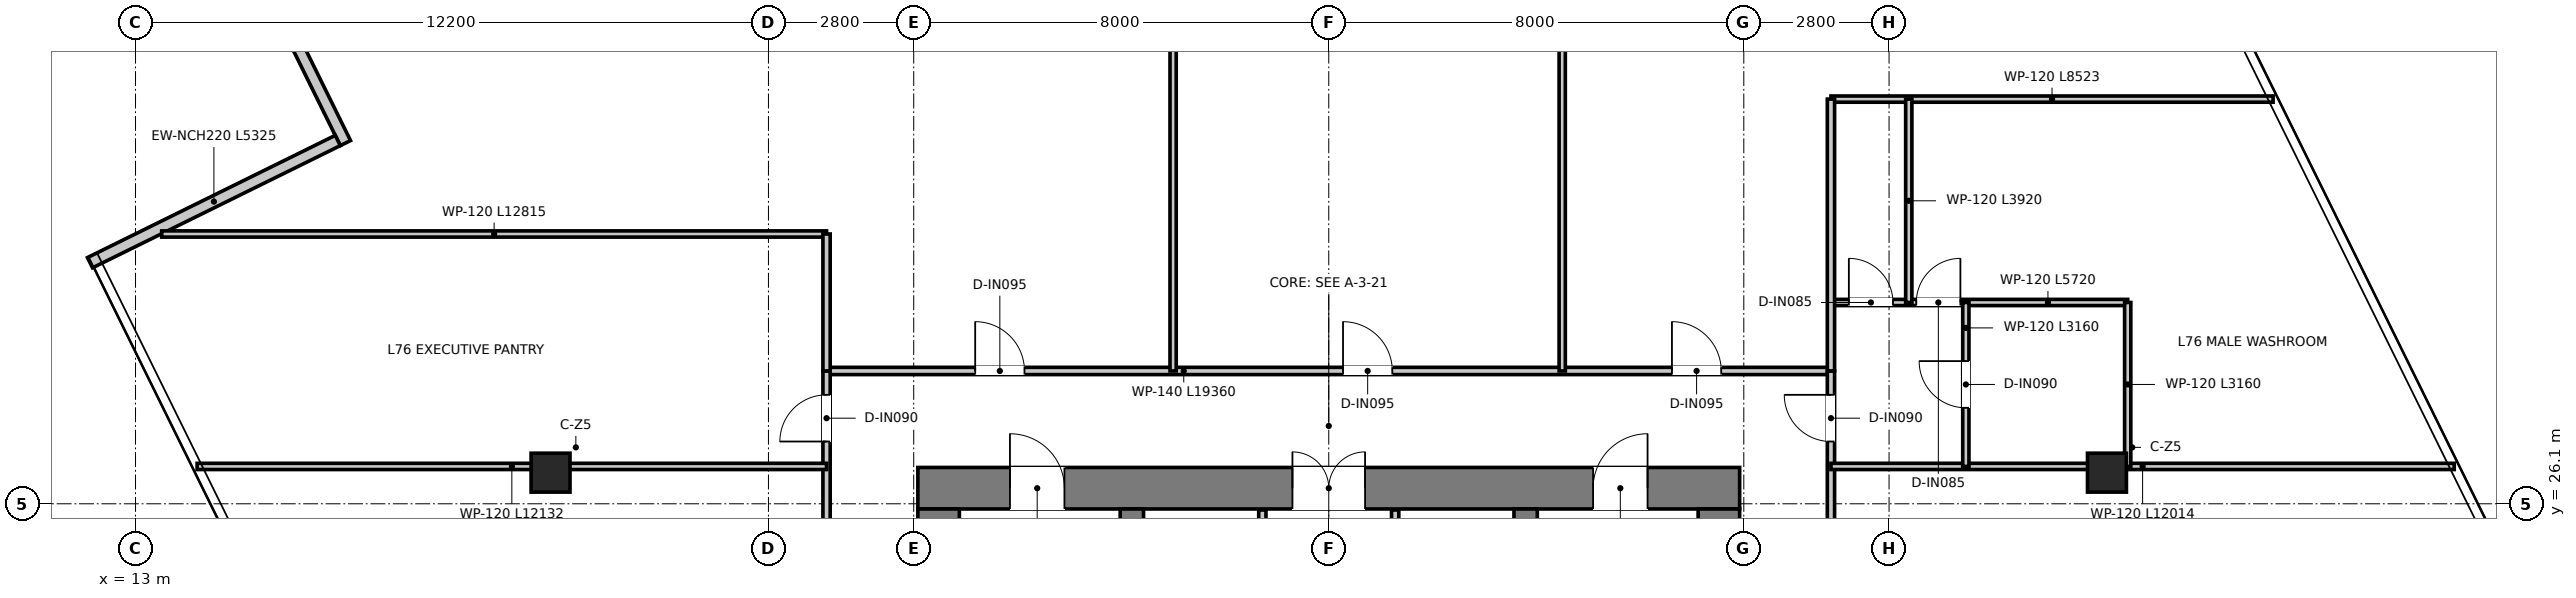
"""IFC4 building model, lengths in metres.
Left out: names, types, materials, properties, quantities, classifications, styles, units other than length and angle.
Written with IfcOpenShell. Run it as: python <this file> out.ifc"""

import sys

from ifc_helpers import new_model, si_unit, direction, frame, frame_2d, origin, origin_2d, place, context, subcontext, project, spatial, rectangle, extrude, source, transform, mapped, element, fill, save


model = new_model("IFC4")
c1 = context("Model", 3, precision=1e-05, world=origin(), true_north=direction((0.0, 1.0)))
c2 = subcontext(c1, "Body", "Model", "MODEL_VIEW")
j1 = project(units=[si_unit("LENGTHUNIT", "METRE"), si_unit("PLANEANGLEUNIT", "RADIAN")], contexts=[c1])
p1 = place(None, origin())
s1 = spatial("IfcSite", under=j1, at=p1, CompositionType="ELEMENT")
p2 = place(p1, origin())
s2 = spatial("IfcBuilding", under=s1, at=p2, CompositionType="ELEMENT")
p3 = place(p2, frame((0.0, 0.0, 310.85)))
s3 = spatial("IfcBuildingStorey", under=s2, at=p3, CompositionType="ELEMENT", Elevation=310.85)
p4 = place(p3, frame((28.08, 26.4, 0.0), z_axis=(0.0, 0.0, 1.0), x_axis=(1.0, 0.0, 0.0)))
e1 = element("IfcWall", 1, at=p4, inside=s3, PredefinedType="SHEAR", context=c2, shape_type="SweptSolid", body=[
    extrude(rectangle(XDim=15.84, YDim=0.8, at=frame_2d((7.92, 0.0))), origin(), (0.0, 0.0, 1.0), 3.95),
])
p5 = place(p4, frame((7.22, 0.0, 0.0)))
e2 = element("IfcOpeningElement", 2, at=p5, cuts=e1, PredefinedType="OPENING", context=c2, shape_type="SweptSolid", body=[
    extrude(rectangle(XDim=1.4, YDim=2.2, at=frame_2d((0.7, 1.1))), frame((0.0, 0.41, 0.0), z_axis=(0.0, -1.0, 0.0), x_axis=(1.0, 0.0, 0.0)), (0.0, 0.0, 1.0), 0.82),
])
p6 = place(p4, frame((1.775, 0.0, 0.0)))
e3 = element("IfcOpeningElement", 3, at=p6, cuts=e1, PredefinedType="OPENING", context=c2, shape_type="SweptSolid", body=[
    extrude(rectangle(XDim=1.05, YDim=2.1, at=frame_2d((0.525, 1.05))), frame((0.0, 0.41, 0.0), z_axis=(0.0, -1.0, 0.0), x_axis=(1.0, 0.0, 0.0)), (0.0, 0.0, 1.0), 0.82),
])
p7 = place(p4, frame((13.015, 0.0, 0.0)))
e4 = element("IfcOpeningElement", 4, at=p7, cuts=e1, PredefinedType="OPENING", context=c2, shape_type="SweptSolid", body=[
    extrude(rectangle(XDim=1.05, YDim=2.1, at=frame_2d((0.525, 1.05))), frame((0.0, 0.41, 0.0), z_axis=(0.0, -1.0, 0.0), x_axis=(1.0, 0.0, 0.0)), (0.0, 0.0, 1.0), 0.82),
])
for number, where, z_axis, x_axis in (
    (5, (28.48, 11.3, 0.0), (0.0, 0.0, 1.0), (0.0, 1.0, 0.0)),
    (6, (43.52, 11.3, 0.0), (0.0, 0.0, 1.0), (0.0, 1.0, 0.0)),
):
    element("IfcWall", number, at=place(p3, frame(where, z_axis=z_axis, x_axis=x_axis)), inside=s3, PredefinedType="SHEAR", context=c2, shape_type="SweptSolid", body=[
        extrude(rectangle(XDim=14.7, YDim=0.8, at=frame_2d((7.35, 0.0))), origin(), (0.0, 0.0, 1.0), 3.95),
    ])
p8 = place(p3, frame((32.205, 13.22, 0.0), z_axis=(0.0, 0.0, 1.0), x_axis=(0.0, 1.0, 0.0)))
e7 = element("IfcWall", 7, at=p8, inside=s3, PredefinedType="SHEAR", context=c2, shape_type="SweptSolid", body=[
    extrude(rectangle(XDim=12.78, YDim=0.45, at=frame_2d((6.39, 0.0))), origin(), (0.0, 0.0, 1.0), 3.95),
])
p9 = place(p8, frame((10.58, 0.0, 0.0)))
e8 = element("IfcOpeningElement", 8, at=p9, cuts=e7, PredefinedType="OPENING", context=c2, shape_type="SweptSolid", body=[
    extrude(rectangle(XDim=1.1, YDim=2.15, at=frame_2d((0.55, 1.075))), frame((0.0, 0.235, 0.0), z_axis=(0.0, -1.0, 0.0), x_axis=(1.0, 0.0, 0.0)), (0.0, 0.0, 1.0), 0.47),
])
p10 = place(p3, frame((39.795, 13.22, 0.0), z_axis=(0.0, 0.0, 1.0), x_axis=(0.0, 1.0, 0.0)))
e9 = element("IfcWall", 9, at=p10, inside=s3, PredefinedType="SHEAR", context=c2, shape_type="SweptSolid", body=[
    extrude(rectangle(XDim=12.78, YDim=0.45, at=frame_2d((6.39, 0.0))), origin(), (0.0, 0.0, 1.0), 3.95),
])
p11 = place(p10, frame((10.58, 0.0, 0.0)))
e10 = element("IfcOpeningElement", 10, at=p11, cuts=e9, PredefinedType="OPENING", context=c2, shape_type="SweptSolid", body=[
    extrude(rectangle(XDim=1.1, YDim=2.15, at=frame_2d((0.55, 1.075))), frame((0.0, 0.235, 0.0), z_axis=(0.0, -1.0, 0.0), x_axis=(1.0, 0.0, 0.0)), (0.0, 0.0, 1.0), 0.47),
])
m1 = source(origin(), c2, "Body", "SweptSolid", [
    extrude(rectangle(XDim=0.75, YDim=0.75, at=origin_2d()), origin(), (0.0, 0.0, 1.0), 3.95),
])
for number, where, z_axis, x_axis in (
    (11, (21.0, 26.7, 0.0), (0.0, 0.0, 1.0), (1.0, 0.0, 0.0)),
    (12, (51.0, 26.7, 0.0), (0.0, 0.0, 1.0), (1.0, 0.0, 0.0)),
):
    element("IfcColumn", number, at=place(p3, frame(where, z_axis=z_axis, x_axis=x_axis)), inside=s3, PredefinedType="COLUMN", context=c2, shape_type="MappedRepresentation", body=[
        mapped(m1, transform((0.0, 0.0, 0.0), x_axis=(1.0, 0.0, 0.0), y_axis=(0.0, 1.0, 0.0), z_axis=(0.0, 0.0, 1.0), scale=1.0)),
    ])
p12 = place(p3, frame((14.594, 38.025, 0.0), z_axis=(0.0, 0.0, 1.0), x_axis=(0.442275503639, -0.896879244314, 0.0)))
e13 = element("IfcWall", 13, at=p12, inside=s3, PredefinedType="ELEMENTEDWALL", context=c2, shape_type="SweptSolid", body=[
    extrude(rectangle(XDim=5.545, YDim=0.22, at=frame_2d((2.772, 0.0))), origin(), (0.0, 0.0, 1.0), 3.67),
])
p13 = place(p3, frame((16.899, 33.102, 0.0), z_axis=(0.0, 0.0, 1.0), x_axis=(-0.896889306105, -0.442255099003, 0.0)))
e14 = element("IfcWall", 14, at=p13, inside=s3, PredefinedType="ELEMENTEDWALL", context=c2, shape_type="SweptSolid", body=[
    extrude(rectangle(XDim=5.325, YDim=0.22, at=frame_2d((2.663, 0.0))), origin(), (0.0, 0.0, 1.0), 3.67),
])
p14 = place(p3, frame((34.72, 20.2, 0.0), z_axis=(0.0, 0.0, 1.0), x_axis=(0.0, 1.0, 0.0)))
e15 = element("IfcWall", 15, at=p14, inside=s3, PredefinedType="PARTITIONING", context=c2, shape_type="SweptSolid", body=[
    extrude(rectangle(XDim=5.78, YDim=0.14, at=frame_2d((2.89, 0.0))), origin(), (0.0, 0.0, 1.0), 2.82),
])
p15 = place(p14, frame((1.05, 0.0, 0.0)))
e16 = element("IfcOpeningElement", 16, at=p15, cuts=e15, PredefinedType="OPENING", context=c2, shape_type="SweptSolid", body=[
    extrude(rectangle(XDim=0.9, YDim=2.1, at=frame_2d((0.45, 1.05))), frame((0.0, 0.08, 0.0), z_axis=(0.0, -1.0, 0.0), x_axis=(1.0, 0.0, 0.0)), (0.0, 0.0, 1.0), 0.16),
])
p16 = place(p3, frame((37.28, 20.2, 0.0), z_axis=(0.0, 0.0, 1.0), x_axis=(0.0, 1.0, 0.0)))
e17 = element("IfcWall", 17, at=p16, inside=s3, PredefinedType="PARTITIONING", context=c2, shape_type="SweptSolid", body=[
    extrude(rectangle(XDim=5.78, YDim=0.14, at=frame_2d((2.89, 0.0))), origin(), (0.0, 0.0, 1.0), 2.82),
])
p17 = place(p16, frame((0.95, 0.0, 0.0)))
e18 = element("IfcOpeningElement", 18, at=p17, cuts=e17, PredefinedType="OPENING", context=c2, shape_type="SweptSolid", body=[
    extrude(rectangle(XDim=1.1, YDim=2.15, at=frame_2d((0.55, 1.075))), frame((0.0, 0.08, 0.0), z_axis=(0.0, -1.0, 0.0), x_axis=(1.0, 0.0, 0.0)), (0.0, 0.0, 1.0), 0.16),
])
p18 = place(p3, frame((26.32, 28.66, 0.0), z_axis=(0.0, 0.0, 1.0), x_axis=(1.0, 0.0, 0.0)))
e19 = element("IfcWall", 19, at=p18, inside=s3, PredefinedType="PARTITIONING", context=c2, shape_type="SweptSolid", body=[
    extrude(rectangle(XDim=19.36, YDim=0.14, at=frame_2d((9.68, 0.0))), origin(), (0.0, 0.0, 1.0), 3.18),
])
p19 = place(p18, frame((2.865, 0.0, 0.0)))
e20 = element("IfcOpeningElement", 20, at=p19, cuts=e19, PredefinedType="OPENING", context=c2, shape_type="SweptSolid", body=[
    extrude(rectangle(XDim=0.95, YDim=2.1, at=frame_2d((0.475, 1.05))), frame((0.0, 0.08, 0.0), z_axis=(0.0, -1.0, 0.0), x_axis=(1.0, 0.0, 0.0)), (0.0, 0.0, 1.0), 0.16),
])
p20 = place(p18, frame((9.955, 0.0, 0.0)))
e21 = element("IfcOpeningElement", 21, at=p20, cuts=e19, PredefinedType="OPENING", context=c2, shape_type="SweptSolid", body=[
    extrude(rectangle(XDim=0.95, YDim=2.1, at=frame_2d((0.475, 1.05))), frame((0.0, 0.08, 0.0), z_axis=(0.0, -1.0, 0.0), x_axis=(1.0, 0.0, 0.0)), (0.0, 0.0, 1.0), 0.16),
])
p21 = place(p18, frame((16.295, 0.0, 0.0)))
e22 = element("IfcOpeningElement", 22, at=p21, cuts=e19, PredefinedType="OPENING", context=c2, shape_type="SweptSolid", body=[
    extrude(rectangle(XDim=0.95, YDim=2.1, at=frame_2d((0.475, 1.05))), frame((0.0, 0.08, 0.0), z_axis=(0.0, -1.0, 0.0), x_axis=(1.0, 0.0, 0.0)), (0.0, 0.0, 1.0), 0.16),
])
p22 = place(p3, frame((26.32, 9.0, 0.0), z_axis=(0.0, 0.0, 1.0), x_axis=(0.0, 1.0, 0.0)))
e23 = element("IfcWall", 23, at=p22, inside=s3, PredefinedType="PARTITIONING", context=c2, shape_type="SweptSolid", body=[
    extrude(rectangle(XDim=19.66, YDim=0.14, at=frame_2d((9.83, 0.0))), origin(), (0.0, 0.0, 1.0), 3.13),
])
p23 = place(p22, frame((18.3, 0.0, 0.0)))
e24 = element("IfcOpeningElement", 24, at=p23, cuts=e23, PredefinedType="OPENING", context=c2, shape_type="SweptSolid", body=[
    extrude(rectangle(XDim=0.9, YDim=2.1, at=frame_2d((0.45, 1.05))), frame((0.0, 0.08, 0.0), z_axis=(0.0, -1.0, 0.0), x_axis=(1.0, 0.0, 0.0)), (0.0, 0.0, 1.0), 0.16),
])
p24 = place(p22, frame((1.95, 0.0, 0.0)))
e25 = element("IfcOpeningElement", 25, at=p24, cuts=e23, PredefinedType="OPENING", context=c2, shape_type="SweptSolid", body=[
    extrude(rectangle(XDim=0.9, YDim=2.1, at=frame_2d((0.45, 1.05))), frame((0.0, 0.08, 0.0), z_axis=(0.0, -1.0, 0.0), x_axis=(1.0, 0.0, 0.0)), (0.0, 0.0, 1.0), 0.16),
])
p25 = place(p22, frame((10.2, 0.0, 0.0)))
e26 = element("IfcOpeningElement", 26, at=p25, cuts=e23, PredefinedType="OPENING", context=c2, shape_type="SweptSolid", body=[
    extrude(rectangle(XDim=0.9, YDim=2.1, at=frame_2d((0.45, 1.05))), frame((0.0, 0.08, 0.0), z_axis=(0.0, -1.0, 0.0), x_axis=(1.0, 0.0, 0.0)), (0.0, 0.0, 1.0), 0.16),
])
p26 = place(p22, frame((14.86, 0.0, 0.0)))
e27 = element("IfcOpeningElement", 27, at=p26, cuts=e23, PredefinedType="OPENING", context=c2, shape_type="SweptSolid", body=[
    extrude(rectangle(XDim=0.9, YDim=2.1, at=frame_2d((0.45, 1.05))), frame((0.0, 0.08, 0.0), z_axis=(0.0, -1.0, 0.0), x_axis=(1.0, 0.0, 0.0)), (0.0, 0.0, 1.0), 0.16),
])
p27 = place(p3, frame((45.68, 9.72, 0.0), z_axis=(0.0, 0.0, 1.0), x_axis=(0.0, 1.0, 0.0)))
e28 = element("IfcWall", 28, at=p27, inside=s3, PredefinedType="PARTITIONING", context=c2, shape_type="SweptSolid", body=[
    extrude(rectangle(XDim=18.94, YDim=0.14, at=frame_2d((9.47, 0.0))), origin(), (0.0, 0.0, 1.0), 3.13),
])
p28 = place(p27, frame((17.58, 0.0, 0.0)))
e29 = element("IfcOpeningElement", 29, at=p28, cuts=e28, PredefinedType="OPENING", context=c2, shape_type="SweptSolid", body=[
    extrude(rectangle(XDim=0.9, YDim=2.1, at=frame_2d((0.45, 1.05))), frame((0.0, 0.08, 0.0), z_axis=(0.0, -1.0, 0.0), x_axis=(1.0, 0.0, 0.0)), (0.0, 0.0, 1.0), 0.16),
])
p29 = place(p27, frame((11.99, 0.0, 0.0)))
e30 = element("IfcOpeningElement", 30, at=p29, cuts=e28, PredefinedType="OPENING", context=c2, shape_type="SweptSolid", body=[
    extrude(rectangle(XDim=0.9, YDim=2.1, at=frame_2d((0.45, 1.05))), frame((0.0, 0.08, 0.0), z_axis=(0.0, -1.0, 0.0), x_axis=(1.0, 0.0, 0.0)), (0.0, 0.0, 1.0), 0.16),
])
p30 = place(p3, frame((45.68, 26.82, 0.0), z_axis=(0.0, 0.0, 1.0), x_axis=(1.0, 0.0, 0.0)))
e31 = element("IfcWall", 31, at=p30, inside=s3, PredefinedType="PARTITIONING", context=c2, shape_type="SweptSolid", body=[
    extrude(rectangle(XDim=12.014, YDim=0.12, at=frame_2d((6.007, 0.0))), origin(), (0.0, 0.0, 1.0), 3.13),
])
p31 = place(p3, frame((45.68, 33.9, 0.0), z_axis=(0.0, 0.0, 1.0), x_axis=(1.0, 0.0, 0.0)))
e32 = element("IfcWall", 32, at=p31, inside=s3, PredefinedType="PARTITIONING", context=c2, shape_type="SweptSolid", body=[
    extrude(rectangle(XDim=8.523, YDim=0.12, at=frame_2d((4.261, 0.0))), origin(), (0.0, 0.0, 1.0), 3.13),
])
p32 = place(p3, frame((45.68, 29.98, 0.0), z_axis=(0.0, 0.0, 1.0), x_axis=(1.0, 0.0, 0.0)))
e33 = element("IfcWall", 33, at=p32, inside=s3, PredefinedType="PARTITIONING", context=c2, shape_type="SweptSolid", body=[
    extrude(rectangle(XDim=5.72, YDim=0.12, at=frame_2d((2.86, 0.0))), origin(), (0.0, 0.0, 1.0), 3.13),
])
p33 = place(p32, frame((1.645, 0.0, 0.0)))
e34 = element("IfcOpeningElement", 34, at=p33, cuts=e33, PredefinedType="OPENING", context=c2, shape_type="SweptSolid", body=[
    extrude(rectangle(XDim=0.85, YDim=2.1, at=frame_2d((0.425, 1.05))), frame((0.0, 0.07, 0.0), z_axis=(0.0, -1.0, 0.0), x_axis=(1.0, 0.0, 0.0)), (0.0, 0.0, 1.0), 0.14),
])
p34 = place(p32, frame((0.345, 0.0, 0.0)))
e35 = element("IfcOpeningElement", 35, at=p34, cuts=e33, PredefinedType="OPENING", context=c2, shape_type="SweptSolid", body=[
    extrude(rectangle(XDim=0.85, YDim=2.1, at=frame_2d((0.425, 1.05))), frame((0.0, 0.07, 0.0), z_axis=(0.0, -1.0, 0.0), x_axis=(1.0, 0.0, 0.0)), (0.0, 0.0, 1.0), 0.14),
])
p35 = place(p3, frame((51.4, 26.82, 0.0), z_axis=(0.0, 0.0, 1.0), x_axis=(0.0, 1.0, 0.0)))
e36 = element("IfcWall", 36, at=p35, inside=s3, PredefinedType="PARTITIONING", context=c2, shape_type="SweptSolid", body=[
    extrude(rectangle(XDim=3.16, YDim=0.12, at=frame_2d((1.58, 0.0))), origin(), (0.0, 0.0, 1.0), 3.67),
])
p36 = place(p3, frame((48.28, 26.82, 0.0), z_axis=(0.0, 0.0, 1.0), x_axis=(0.0, 1.0, 0.0)))
e37 = element("IfcWall", 37, at=p36, inside=s3, PredefinedType="PARTITIONING", context=c2, shape_type="SweptSolid", body=[
    extrude(rectangle(XDim=3.16, YDim=0.12, at=frame_2d((1.58, 0.0))), origin(), (0.0, 0.0, 1.0), 3.18),
])
p37 = place(p36, frame((1.13, 0.0, 0.0)))
e38 = element("IfcOpeningElement", 38, at=p37, cuts=e37, PredefinedType="OPENING", context=c2, shape_type="SweptSolid", body=[
    extrude(rectangle(XDim=0.9, YDim=2.1, at=frame_2d((0.45, 1.05))), frame((0.0, 0.07, 0.0), z_axis=(0.0, -1.0, 0.0), x_axis=(1.0, 0.0, 0.0)), (0.0, 0.0, 1.0), 0.14),
])
p38 = place(p3, frame((47.18, 29.98, 0.0), z_axis=(0.0, 0.0, 1.0), x_axis=(0.0, 1.0, 0.0)))
e39 = element("IfcWall", 39, at=p38, inside=s3, PredefinedType="PARTITIONING", context=c2, shape_type="SweptSolid", body=[
    extrude(rectangle(XDim=3.92, YDim=0.12, at=frame_2d((1.96, 0.0))), origin(), (0.0, 0.0, 1.0), 3.31),
])
p39 = place(p3, frame((14.188, 26.82, 0.0), z_axis=(0.0, 0.0, 1.0), x_axis=(1.0, 0.0, 0.0)))
e40 = element("IfcWall", 40, at=p39, inside=s3, PredefinedType="PARTITIONING", context=c2, shape_type="SweptSolid", body=[
    extrude(rectangle(XDim=12.133, YDim=0.12, at=frame_2d((6.066, 0.0))), origin(), (0.0, 0.0, 1.0), 3.13),
])
p40 = place(p3, frame((13.505, 31.3, 0.0), z_axis=(0.0, 0.0, 1.0), x_axis=(1.0, 0.0, 0.0)))
e41 = element("IfcWall", 41, at=p40, inside=s3, PredefinedType="PARTITIONING", context=c2, shape_type="SweptSolid", body=[
    extrude(rectangle(XDim=12.815, YDim=0.12, at=frame_2d((6.408, 0.0))), origin(), (0.0, 0.0, 1.0), 3.13),
])
p41 = place(p3, frame((26.32, 28.66, 0.0), z_axis=(0.0, 0.0, 1.0), x_axis=(0.0, 1.0, 0.0)))
e42 = element("IfcWall", 42, at=p41, inside=s3, PredefinedType="PARTITIONING", context=c2, shape_type="SweptSolid", body=[
    extrude(rectangle(XDim=2.64, YDim=0.14, at=frame_2d((1.32, 0.0))), origin(), (0.0, 0.0, 1.0), 3.43),
])
p42 = place(p3, frame((45.68, 28.66, 0.0), z_axis=(0.0, 0.0, 1.0), x_axis=(0.0, 1.0, 0.0)))
e43 = element("IfcWall", 43, at=p42, inside=s3, PredefinedType="PARTITIONING", context=c2, shape_type="SweptSolid", body=[
    extrude(rectangle(XDim=5.24, YDim=0.14, at=frame_2d((2.62, 0.0))), origin(), (0.0, 0.0, 1.0), 3.43),
])
p43 = place(p3, frame((33.0, 28.66, 0.0), z_axis=(0.0, 0.0, 1.0), x_axis=(0.0, 1.0, 0.0)))
e44 = element("IfcWall", 44, at=p43, inside=s3, PredefinedType="PARTITIONING", context=c2, shape_type="SweptSolid", body=[
    extrude(rectangle(XDim=18.314, YDim=0.12, at=frame_2d((9.157, 0.0))), origin(), (0.0, 0.0, 1.0), 3.13),
])
p44 = place(p3, frame((40.5, 28.66, 0.0), z_axis=(0.0, 0.0, 1.0), x_axis=(0.0, 1.0, 0.0)))
e45 = element("IfcWall", 45, at=p44, inside=s3, PredefinedType="PARTITIONING", context=c2, shape_type="SweptSolid", body=[
    extrude(rectangle(XDim=20.738, YDim=0.12, at=frame_2d((10.369, 0.0))), origin(), (0.0, 0.0, 1.0), 3.13),
])
p45 = place(p5, origin())
e46 = element("IfcDoor", 46, at=p45, inside=s3, OperationType="DOUBLE_DOOR_SINGLE_SWING", PredefinedType="DOOR", context=c2, shape_type="SweptSolid", body=[
    extrude(rectangle(XDim=1.4, YDim=2.2, at=frame_2d((0.7, 1.1))), frame((0.0, 0.025, 0.0), z_axis=(0.0, -1.0, 0.0), x_axis=(1.0, 0.0, 0.0)), (0.0, 0.0, 1.0), 0.05),
])
fill(e2, e46)
p46 = place(p6, origin())
e47 = element("IfcDoor", 47, at=p46, inside=s3, OperationType="SINGLE_SWING_LEFT", PredefinedType="DOOR", context=c2, shape_type="SweptSolid", body=[
    extrude(rectangle(XDim=1.05, YDim=2.1, at=frame_2d((0.525, 1.05))), frame((0.0, 0.025, 0.0), z_axis=(0.0, -1.0, 0.0), x_axis=(1.0, 0.0, 0.0)), (0.0, 0.0, 1.0), 0.05),
])
fill(e3, e47)
p47 = place(p7, origin())
e48 = element("IfcDoor", 48, at=p47, inside=s3, OperationType="SINGLE_SWING_RIGHT", PredefinedType="DOOR", context=c2, shape_type="SweptSolid", body=[
    extrude(rectangle(XDim=1.05, YDim=2.1, at=frame_2d((0.525, 1.05))), frame((0.0, 0.025, 0.0), z_axis=(0.0, -1.0, 0.0), x_axis=(1.0, 0.0, 0.0)), (0.0, 0.0, 1.0), 0.05),
])
fill(e4, e48)
p48 = place(p28, origin())
e49 = element("IfcDoor", 49, at=p48, inside=s3, OperationType="SINGLE_SWING_RIGHT", PredefinedType="DOOR", context=c2, shape_type="SweptSolid", body=[
    extrude(rectangle(XDim=0.9, YDim=2.1, at=frame_2d((0.45, 1.05))), frame((0.0, 0.025, 0.0), z_axis=(0.0, -1.0, 0.0), x_axis=(1.0, 0.0, 0.0)), (0.0, 0.0, 1.0), 0.05),
])
fill(e29, e49)
p49 = place(p23, origin())
e50 = element("IfcDoor", 50, at=p49, inside=s3, OperationType="SINGLE_SWING_LEFT", PredefinedType="DOOR", context=c2, shape_type="SweptSolid", body=[
    extrude(rectangle(XDim=0.9, YDim=2.1, at=frame_2d((0.45, 1.05))), frame((0.0, 0.025, 0.0), z_axis=(0.0, -1.0, 0.0), x_axis=(1.0, 0.0, 0.0)), (0.0, 0.0, 1.0), 0.05),
])
fill(e24, e50)
p50 = place(p33, origin())
e51 = element("IfcDoor", 51, at=p50, inside=s3, OperationType="SINGLE_SWING_RIGHT", PredefinedType="DOOR", context=c2, shape_type="SweptSolid", body=[
    extrude(rectangle(XDim=0.85, YDim=2.1, at=frame_2d((0.425, 1.05))), frame((0.0, 0.025, 0.0), z_axis=(0.0, -1.0, 0.0), x_axis=(1.0, 0.0, 0.0)), (0.0, 0.0, 1.0), 0.05),
])
fill(e34, e51)
p51 = place(p34, origin())
e52 = element("IfcDoor", 52, at=p51, inside=s3, OperationType="SINGLE_SWING_LEFT", PredefinedType="DOOR", context=c2, shape_type="SweptSolid", body=[
    extrude(rectangle(XDim=0.85, YDim=2.1, at=frame_2d((0.425, 1.05))), frame((0.0, 0.025, 0.0), z_axis=(0.0, -1.0, 0.0), x_axis=(1.0, 0.0, 0.0)), (0.0, 0.0, 1.0), 0.05),
])
fill(e35, e52)
p52 = place(p37, origin())
e53 = element("IfcDoor", 53, at=p52, inside=s3, OperationType="SINGLE_SWING_RIGHT", PredefinedType="DOOR", context=c2, shape_type="SweptSolid", body=[
    extrude(rectangle(XDim=0.9, YDim=2.1, at=frame_2d((0.45, 1.05))), frame((0.0, 0.025, 0.0), z_axis=(0.0, -1.0, 0.0), x_axis=(1.0, 0.0, 0.0)), (0.0, 0.0, 1.0), 0.05),
])
fill(e38, e53)
p53 = place(p19, origin())
e54 = element("IfcDoor", 54, at=p53, inside=s3, OperationType="SINGLE_SWING_LEFT", PredefinedType="DOOR", context=c2, shape_type="SweptSolid", body=[
    extrude(rectangle(XDim=0.95, YDim=2.1, at=frame_2d((0.475, 1.05))), frame((0.0, 0.025, 0.0), z_axis=(0.0, -1.0, 0.0), x_axis=(1.0, 0.0, 0.0)), (0.0, 0.0, 1.0), 0.05),
])
fill(e20, e54)
p54 = place(p20, origin())
e55 = element("IfcDoor", 55, at=p54, inside=s3, OperationType="SINGLE_SWING_LEFT", PredefinedType="DOOR", context=c2, shape_type="SweptSolid", body=[
    extrude(rectangle(XDim=0.95, YDim=2.1, at=frame_2d((0.475, 1.05))), frame((0.0, 0.025, 0.0), z_axis=(0.0, -1.0, 0.0), x_axis=(1.0, 0.0, 0.0)), (0.0, 0.0, 1.0), 0.05),
])
fill(e21, e55)
p55 = place(p21, origin())
e56 = element("IfcDoor", 56, at=p55, inside=s3, OperationType="SINGLE_SWING_LEFT", PredefinedType="DOOR", context=c2, shape_type="SweptSolid", body=[
    extrude(rectangle(XDim=0.95, YDim=2.1, at=frame_2d((0.475, 1.05))), frame((0.0, 0.025, 0.0), z_axis=(0.0, -1.0, 0.0), x_axis=(1.0, 0.0, 0.0)), (0.0, 0.0, 1.0), 0.05),
])
fill(e22, e56)
save(model, sys.argv[1])
